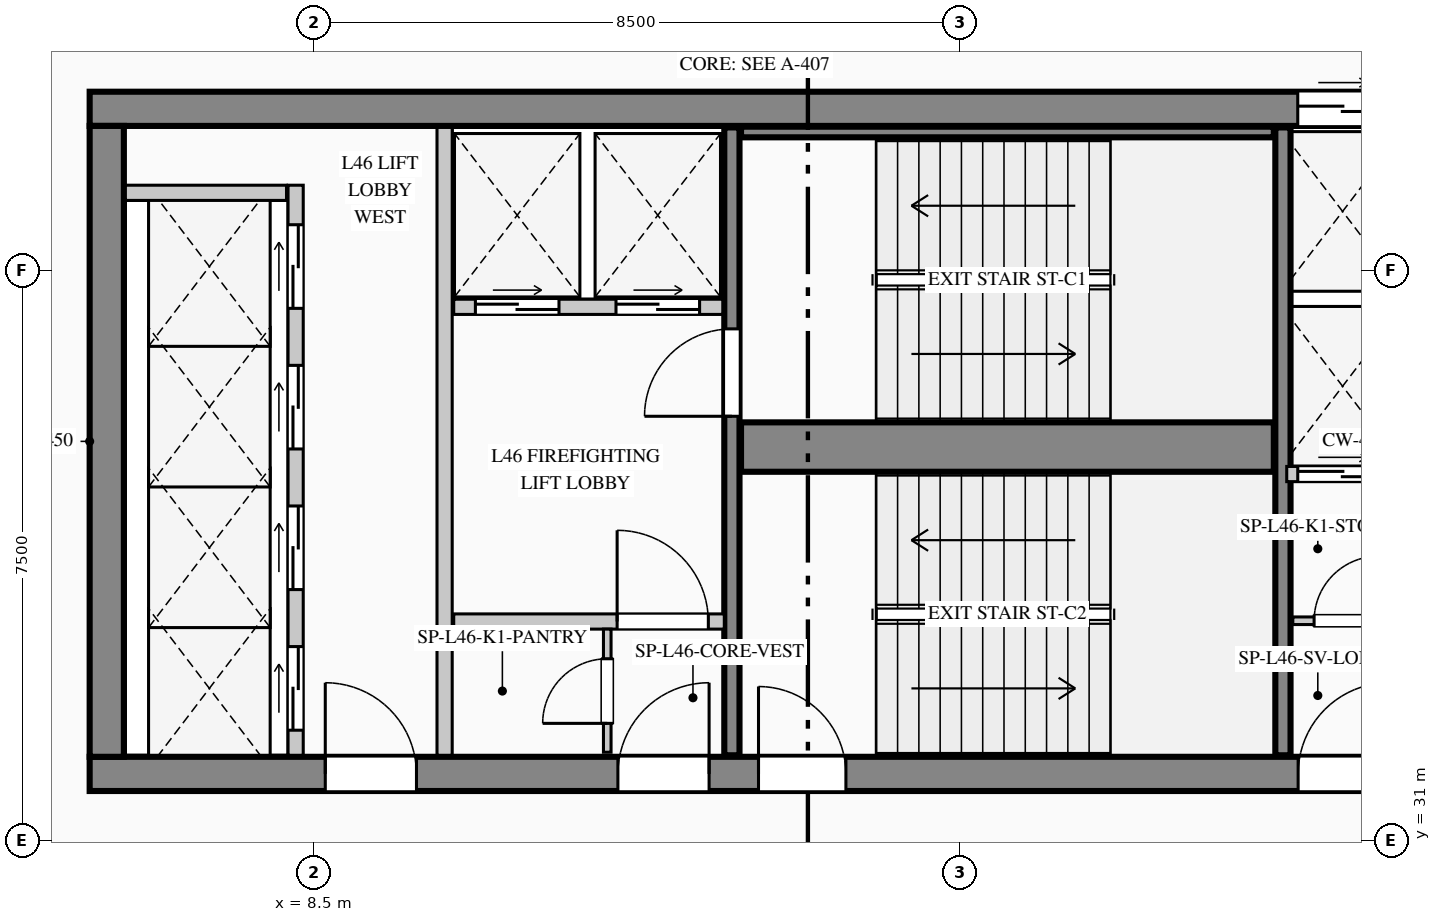
"""IFC4 building model, lengths in metres.
Left out: names, types, materials, properties, quantities, classifications, styles, units other than length and angle.
Written with IfcOpenShell. Run it as: python <this file> out.ifc"""

import sys

from ifc_helpers import new_model, si_unit, direction, frame, frame_2d, origin, place, context, subcontext, project, spatial, rectangle, extrude, element, fill, save


model = new_model("IFC4")
c1 = context("Model", 3, precision=1e-05, world=origin(), true_north=direction((0.0, 1.0)))
c2 = subcontext(c1, "Body", "Model", "MODEL_VIEW")
j1 = project(units=[si_unit("LENGTHUNIT", "METRE"), si_unit("PLANEANGLEUNIT", "RADIAN")], contexts=[c1])
p1 = place(None, origin())
s1 = spatial("IfcSite", under=j1, at=p1, CompositionType="ELEMENT")
p2 = place(p1, origin())
s2 = spatial("IfcBuilding", under=s1, at=p2, CompositionType="ELEMENT")
p3 = place(p2, frame((0.0, 0.0, 195.6)))
s3 = spatial("IfcBuildingStorey", under=s2, at=p3, CompositionType="ELEMENT", Elevation=195.6)
p4 = place(p3, frame((5.55, 40.625, 0.0), z_axis=(0.0, 0.0, 1.0), x_axis=(1.0, 0.0, 0.0)))
e1 = element("IfcWall", 1, at=p4, inside=s3, PredefinedType="SHEAR", context=c2, shape_type="SweptSolid", body=[
    extrude(rectangle(XDim=17.75, YDim=0.45, at=frame_2d((8.875, 0.0))), origin(), (0.0, 0.0, 1.0), 3.95),
])
p5 = place(p4, frame((15.895, 0.0, 0.0)))
e2 = element("IfcOpeningElement", 2, at=p5, cuts=e1, PredefinedType="OPENING", context=c2, shape_type="SweptSolid", body=[
    extrude(rectangle(XDim=1.18, YDim=2.25, at=frame_2d((0.59, 1.125))), frame((0.0, 0.235, 0.0), z_axis=(0.0, -1.0, 0.0), x_axis=(1.0, 0.0, 0.0)), (0.0, 0.0, 1.0), 0.47),
])
p6 = place(p3, frame((5.55, 31.875, 0.0), z_axis=(0.0, 0.0, 1.0), x_axis=(1.0, 0.0, 0.0)))
e3 = element("IfcWall", 3, at=p6, inside=s3, PredefinedType="SHEAR", context=c2, shape_type="SweptSolid", body=[
    extrude(rectangle(XDim=17.75, YDim=0.45, at=frame_2d((8.875, 0.0))), origin(), (0.0, 0.0, 1.0), 3.95),
])
p7 = place(p6, frame((3.1, 0.0, 0.0)))
e4 = element("IfcOpeningElement", 4, at=p7, cuts=e3, PredefinedType="OPENING", context=c2, shape_type="SweptSolid", body=[
    extrude(rectangle(XDim=1.2, YDim=2.2, at=frame_2d((0.6, 1.1))), frame((0.0, 0.235, 0.0), z_axis=(0.0, -1.0, 0.0), x_axis=(1.0, 0.0, 0.0)), (0.0, 0.0, 1.0), 0.47),
])
p8 = place(p6, frame((6.95, 0.0, 0.0)))
e5 = element("IfcOpeningElement", 5, at=p8, cuts=e3, PredefinedType="OPENING", context=c2, shape_type="SweptSolid", body=[
    extrude(rectangle(XDim=1.2, YDim=2.2, at=frame_2d((0.6, 1.1))), frame((0.0, 0.235, 0.0), z_axis=(0.0, -1.0, 0.0), x_axis=(1.0, 0.0, 0.0)), (0.0, 0.0, 1.0), 0.47),
])
p9 = place(p6, frame((8.8, 0.0, 0.0)))
e6 = element("IfcOpeningElement", 6, at=p9, cuts=e3, PredefinedType="OPENING", context=c2, shape_type="SweptSolid", body=[
    extrude(rectangle(XDim=1.15, YDim=2.2, at=frame_2d((0.575, 1.1))), frame((0.0, 0.235, 0.0), z_axis=(0.0, -1.0, 0.0), x_axis=(1.0, 0.0, 0.0)), (0.0, 0.0, 1.0), 0.47),
])
p10 = place(p6, frame((15.9, 0.0, 0.0)))
e7 = element("IfcOpeningElement", 7, at=p10, cuts=e3, PredefinedType="OPENING", context=c2, shape_type="SweptSolid", body=[
    extrude(rectangle(XDim=1.2, YDim=2.2, at=frame_2d((0.6, 1.1))), frame((0.0, 0.235, 0.0), z_axis=(0.0, -1.0, 0.0), x_axis=(1.0, 0.0, 0.0)), (0.0, 0.0, 1.0), 0.47),
])
p11 = place(p3, frame((5.775, 32.1, 0.0), z_axis=(0.0, 0.0, 1.0), x_axis=(0.0, 1.0, 0.0)))
e8 = element("IfcWall", 8, at=p11, inside=s3, PredefinedType="SHEAR", context=c2, shape_type="SweptSolid", body=[
    extrude(rectangle(XDim=8.3, YDim=0.45, at=frame_2d((4.15, 0.0))), origin(), (0.0, 0.0, 1.0), 3.95),
])
p12 = place(p3, frame((14.0, 32.12, 0.0), z_axis=(0.0, 0.0, 1.0), x_axis=(0.0, 1.0, 0.0)))
e9 = element("IfcWall", 9, at=p12, inside=s3, PredefinedType="SHEAR", context=c2, shape_type="SweptSolid", body=[
    extrude(rectangle(XDim=8.26, YDim=0.2, at=frame_2d((4.13, 0.0))), origin(), (0.0, 0.0, 1.0), 3.95),
])
p13 = place(p12, frame((4.46, 0.0, 0.0)))
e10 = element("IfcOpeningElement", 10, at=p13, cuts=e9, PredefinedType="OPENING", context=c2, shape_type="SweptSolid", body=[
    extrude(rectangle(XDim=1.15, YDim=2.2, at=frame_2d((0.575, 1.1))), frame((0.0, 0.11, 0.0), z_axis=(0.0, -1.0, 0.0), x_axis=(1.0, 0.0, 0.0)), (0.0, 0.0, 1.0), 0.22),
])
p14 = place(p3, frame((14.12, 36.175, 0.0), z_axis=(0.0, 0.0, 1.0), x_axis=(1.0, 0.0, 0.0)))
e11 = element("IfcWall", 11, at=p14, inside=s3, PredefinedType="SHEAR", context=c2, shape_type="SweptSolid", body=[
    extrude(rectangle(XDim=7.01, YDim=0.65, at=frame_2d((3.505, 0.0))), origin(), (0.0, 0.0, 1.0), 3.95),
])
p15 = place(p3, frame((21.25, 32.12, 0.0), z_axis=(0.0, 0.0, 1.0), x_axis=(0.0, 1.0, 0.0)))
e12 = element("IfcWall", 12, at=p15, inside=s3, PredefinedType="SHEAR", context=c2, shape_type="SweptSolid", body=[
    extrude(rectangle(XDim=8.26, YDim=0.2, at=frame_2d((4.13, 0.0))), origin(), (0.0, 0.0, 1.0), 3.95),
])
p16 = place(p3, frame((14.12, 40.32, 0.0), z_axis=(0.0, 0.0, 1.0), x_axis=(1.0, 0.0, 0.0)))
e13 = element("IfcWall", 13, at=p16, inside=s3, PredefinedType="SHEAR", context=c2, shape_type="SweptSolid", body=[
    extrude(rectangle(XDim=7.01, YDim=0.14, at=frame_2d((3.505, 0.0))), origin(), (0.0, 0.0, 1.0), 3.95),
])
p17 = place(p3, frame((7.469, 4.63, 0.0), z_axis=(0.0, 0.0, 1.0), x_axis=(-0.123515300309, 0.992342667928, 0.0)))
e14 = element("IfcWall", 14, at=p17, inside=s3, PredefinedType="STANDARD", context=c2, shape_type="SweptSolid", body=[
    extrude(rectangle(XDim=37.024, YDim=0.26, at=frame_2d((18.512, 0.0))), origin(), (0.0, 0.0, 1.0), 3.7),
])
p18 = place(p17, frame((11.978, 0.0, 0.9)))
e15 = element("IfcOpeningElement", 15, at=p18, cuts=e14, PredefinedType="OPENING", context=c2, shape_type="SweptSolid", body=[
    extrude(rectangle(XDim=2.7, YDim=2.1, at=frame_2d((1.35, 1.05))), frame((0.0, 0.14, 0.0), z_axis=(0.0, -1.0, 0.0), x_axis=(1.0, 0.0, 0.0)), (0.0, 0.0, 1.0), 0.28),
])
p19 = place(p3, frame((8.26, 32.12, 0.0), z_axis=(0.0, 0.0, 1.0), x_axis=(0.0, 1.0, 0.0)))
e16 = element("IfcWall", 16, at=p19, inside=s3, PredefinedType="PARTITIONING", context=c2, shape_type="SweptSolid", body=[
    extrude(rectangle(XDim=7.5, YDim=0.2, at=frame_2d((3.75, 0.0))), origin(), (0.0, 0.0, 1.0), 3.7),
])
p20 = place(p19, frame((0.33, 0.0, 0.0)))
e17 = element("IfcOpeningElement", 17, at=p20, cuts=e16, PredefinedType="OPENING", context=c2, shape_type="SweptSolid", body=[
    extrude(rectangle(XDim=1.1, YDim=2.2, at=frame_2d((0.55, 1.1))), frame((0.0, 0.11, 0.0), z_axis=(0.0, -1.0, 0.0), x_axis=(1.0, 0.0, 0.0)), (0.0, 0.0, 1.0), 0.22),
])
p21 = place(p19, frame((2.18, 0.0, 0.0)))
e18 = element("IfcOpeningElement", 18, at=p21, cuts=e16, PredefinedType="OPENING", context=c2, shape_type="SweptSolid", body=[
    extrude(rectangle(XDim=1.1, YDim=2.2, at=frame_2d((0.55, 1.1))), frame((0.0, 0.11, 0.0), z_axis=(0.0, -1.0, 0.0), x_axis=(1.0, 0.0, 0.0)), (0.0, 0.0, 1.0), 0.22),
])
p22 = place(p19, frame((4.03, 0.0, 0.0)))
e19 = element("IfcOpeningElement", 19, at=p22, cuts=e16, PredefinedType="OPENING", context=c2, shape_type="SweptSolid", body=[
    extrude(rectangle(XDim=1.1, YDim=2.2, at=frame_2d((0.55, 1.1))), frame((0.0, 0.11, 0.0), z_axis=(0.0, -1.0, 0.0), x_axis=(1.0, 0.0, 0.0)), (0.0, 0.0, 1.0), 0.22),
])
p23 = place(p19, frame((5.88, 0.0, 0.0)))
e20 = element("IfcOpeningElement", 20, at=p23, cuts=e16, PredefinedType="OPENING", context=c2, shape_type="SweptSolid", body=[
    extrude(rectangle(XDim=1.1, YDim=2.2, at=frame_2d((0.55, 1.1))), frame((0.0, 0.11, 0.0), z_axis=(0.0, -1.0, 0.0), x_axis=(1.0, 0.0, 0.0)), (0.0, 0.0, 1.0), 0.22),
])
p24 = place(p3, frame((6.02, 39.52, 0.0), z_axis=(0.0, 0.0, 1.0), x_axis=(1.0, 0.0, 0.0)))
e21 = element("IfcWall", 21, at=p24, inside=s3, PredefinedType="PARTITIONING", context=c2, shape_type="SweptSolid", body=[
    extrude(rectangle(XDim=2.12, YDim=0.2, at=frame_2d((1.06, 0.0))), origin(), (0.0, 0.0, 1.0), 3.7),
])
p25 = place(p3, frame((10.22, 32.12, 0.0), z_axis=(0.0, 0.0, 1.0), x_axis=(0.0, 1.0, 0.0)))
e22 = element("IfcWall", 22, at=p25, inside=s3, PredefinedType="PARTITIONING", context=c2, shape_type="SweptSolid", body=[
    extrude(rectangle(XDim=8.26, YDim=0.2, at=frame_2d((4.13, 0.0))), origin(), (0.0, 0.0, 1.0), 3.7),
])
p26 = place(p3, frame((10.34, 38.02, 0.0), z_axis=(0.0, 0.0, 1.0), x_axis=(1.0, 0.0, 0.0)))
e23 = element("IfcWall", 23, at=p26, inside=s3, PredefinedType="PARTITIONING", context=c2, shape_type="SweptSolid", body=[
    extrude(rectangle(XDim=3.54, YDim=0.2, at=frame_2d((1.77, 0.0))), origin(), (0.0, 0.0, 1.0), 3.7),
])
p27 = place(p26, frame((0.285, 0.0, 0.0)))
e24 = element("IfcOpeningElement", 24, at=p27, cuts=e23, PredefinedType="OPENING", context=c2, shape_type="SweptSolid", body=[
    extrude(rectangle(XDim=1.1, YDim=2.2, at=frame_2d((0.55, 1.1))), frame((0.0, 0.11, 0.0), z_axis=(0.0, -1.0, 0.0), x_axis=(1.0, 0.0, 0.0)), (0.0, 0.0, 1.0), 0.22),
])
p28 = place(p26, frame((2.135, 0.0, 0.0)))
e25 = element("IfcOpeningElement", 25, at=p28, cuts=e23, PredefinedType="OPENING", context=c2, shape_type="SweptSolid", body=[
    extrude(rectangle(XDim=1.1, YDim=2.2, at=frame_2d((0.55, 1.1))), frame((0.0, 0.11, 0.0), z_axis=(0.0, -1.0, 0.0), x_axis=(1.0, 0.0, 0.0)), (0.0, 0.0, 1.0), 0.22),
])
p29 = place(p3, frame((10.34, 33.88, 0.0), z_axis=(0.0, 0.0, 1.0), x_axis=(1.0, 0.0, 0.0)))
e26 = element("IfcWall", 26, at=p29, inside=s3, PredefinedType="PARTITIONING", context=c2, shape_type="SweptSolid", body=[
    extrude(rectangle(XDim=3.56, YDim=0.2, at=frame_2d((1.78, 0.0))), origin(), (0.0, 0.0, 1.0), 3.7),
])
p30 = place(p29, frame((2.15, 0.0, 0.0)))
e27 = element("IfcOpeningElement", 27, at=p30, cuts=e26, PredefinedType="OPENING", context=c2, shape_type="SweptSolid", body=[
    extrude(rectangle(XDim=1.2, YDim=2.2, at=frame_2d((0.6, 1.1))), frame((0.0, 0.11, 0.0), z_axis=(0.0, -1.0, 0.0), x_axis=(1.0, 0.0, 0.0)), (0.0, 0.0, 1.0), 0.22),
])
p31 = place(p3, frame((12.36, 32.16, 0.0), z_axis=(0.0, 0.0, 1.0), x_axis=(0.0, 1.0, 0.0)))
e28 = element("IfcWall", 28, at=p31, inside=s3, PredefinedType="PARTITIONING", context=c2, shape_type="SweptSolid", body=[
    extrude(rectangle(XDim=1.62, YDim=0.1, at=frame_2d((0.81, 0.0))), origin(), (0.0, 0.0, 1.0), 3.7),
])
p32 = place(p31, frame((0.38, 0.0, 0.0)))
e29 = element("IfcOpeningElement", 29, at=p32, cuts=e28, PredefinedType="OPENING", context=c2, shape_type="SweptSolid", body=[
    extrude(rectangle(XDim=0.85, YDim=2.1, at=frame_2d((0.425, 1.05))), frame((0.0, 0.06, 0.0), z_axis=(0.0, -1.0, 0.0), x_axis=(1.0, 0.0, 0.0)), (0.0, 0.0, 1.0), 0.12),
])
p33 = place(p3, frame((21.38, 33.89, 0.0), z_axis=(0.0, 0.0, 1.0), x_axis=(1.0, 0.0, 0.0)))
e30 = element("IfcWall", 30, at=p33, inside=s3, PredefinedType="PARTITIONING", context=c2, shape_type="SweptSolid", body=[
    extrude(rectangle(XDim=1.42, YDim=0.1, at=frame_2d((0.71, 0.0))), origin(), (0.0, 0.0, 1.0), 3.7),
])
p34 = place(p33, frame((0.28, 0.0, 0.0)))
e31 = element("IfcOpeningElement", 31, at=p34, cuts=e30, PredefinedType="OPENING", context=c2, shape_type="SweptSolid", body=[
    extrude(rectangle(XDim=0.85, YDim=2.1, at=frame_2d((0.425, 1.05))), frame((0.0, 0.06, 0.0), z_axis=(0.0, -1.0, 0.0), x_axis=(1.0, 0.0, 0.0)), (0.0, 0.0, 1.0), 0.12),
])
p35 = place(p3, frame((21.3, 35.82, 0.0), z_axis=(0.0, 0.0, 1.0), x_axis=(1.0, 0.0, 0.0)))
e32 = element("IfcWall", 32, at=p35, inside=s3, PredefinedType="PARTITIONING", context=c2, shape_type="SweptSolid", body=[
    extrude(rectangle(XDim=1.5, YDim=0.2, at=frame_2d((0.75, 0.0))), origin(), (0.0, 0.0, 1.0), 3.7),
])
p36 = place(p35, frame((0.145, 0.0, 0.0)))
e33 = element("IfcOpeningElement", 33, at=p36, cuts=e32, PredefinedType="OPENING", context=c2, shape_type="SweptSolid", body=[
    extrude(rectangle(XDim=1.18, YDim=2.25, at=frame_2d((0.59, 1.125))), frame((0.0, 0.11, 0.0), z_axis=(0.0, -1.0, 0.0), x_axis=(1.0, 0.0, 0.0)), (0.0, 0.0, 1.0), 0.22),
])
p37 = place(p7, origin())
e34 = element("IfcDoor", 34, at=p37, inside=s3, OperationType="SINGLE_SWING_LEFT", PredefinedType="DOOR", context=c2, shape_type="SweptSolid", body=[
    extrude(rectangle(XDim=1.2, YDim=2.2, at=frame_2d((0.6, 1.1))), frame((0.0, 0.025, 0.0), z_axis=(0.0, -1.0, 0.0), x_axis=(1.0, 0.0, 0.0)), (0.0, 0.0, 1.0), 0.05),
])
fill(e4, e34)
p38 = place(p8, origin())
e35 = element("IfcDoor", 35, at=p38, inside=s3, OperationType="SINGLE_SWING_RIGHT", PredefinedType="DOOR", context=c2, shape_type="SweptSolid", body=[
    extrude(rectangle(XDim=1.2, YDim=2.2, at=frame_2d((0.6, 1.1))), frame((0.0, 0.025, 0.0), z_axis=(0.0, -1.0, 0.0), x_axis=(1.0, 0.0, 0.0)), (0.0, 0.0, 1.0), 0.05),
])
fill(e5, e35)
p39 = place(p9, origin())
e36 = element("IfcDoor", 36, at=p39, inside=s3, OperationType="SINGLE_SWING_LEFT", PredefinedType="DOOR", context=c2, shape_type="SweptSolid", body=[
    extrude(rectangle(XDim=1.15, YDim=2.2, at=frame_2d((0.575, 1.1))), frame((0.0, 0.025, 0.0), z_axis=(0.0, -1.0, 0.0), x_axis=(1.0, 0.0, 0.0)), (0.0, 0.0, 1.0), 0.05),
])
fill(e6, e36)
p40 = place(p10, origin())
e37 = element("IfcDoor", 37, at=p40, inside=s3, OperationType="SINGLE_SWING_RIGHT", PredefinedType="DOOR", context=c2, shape_type="SweptSolid", body=[
    extrude(rectangle(XDim=1.2, YDim=2.2, at=frame_2d((0.6, 1.1))), frame((0.0, 0.025, 0.0), z_axis=(0.0, -1.0, 0.0), x_axis=(1.0, 0.0, 0.0)), (0.0, 0.0, 1.0), 0.05),
])
fill(e7, e37)
p41 = place(p30, origin())
e38 = element("IfcDoor", 38, at=p41, inside=s3, OperationType="SINGLE_SWING_LEFT", PredefinedType="DOOR", context=c2, shape_type="SweptSolid", body=[
    extrude(rectangle(XDim=1.2, YDim=2.2, at=frame_2d((0.6, 1.1))), frame((0.0, 0.025, 0.0), z_axis=(0.0, -1.0, 0.0), x_axis=(1.0, 0.0, 0.0)), (0.0, 0.0, 1.0), 0.05),
])
fill(e27, e38)
p42 = place(p32, origin())
e39 = element("IfcDoor", 39, at=p42, inside=s3, OperationType="SINGLE_SWING_LEFT", PredefinedType="DOOR", context=c2, shape_type="SweptSolid", body=[
    extrude(rectangle(XDim=0.85, YDim=2.1, at=frame_2d((0.425, 1.05))), frame((0.0, 0.025, 0.0), z_axis=(0.0, -1.0, 0.0), x_axis=(1.0, 0.0, 0.0)), (0.0, 0.0, 1.0), 0.05),
])
fill(e29, e39)
p43 = place(p34, origin())
e40 = element("IfcDoor", 40, at=p43, inside=s3, OperationType="SINGLE_SWING_RIGHT", PredefinedType="DOOR", context=c2, shape_type="SweptSolid", body=[
    extrude(rectangle(XDim=0.85, YDim=2.1, at=frame_2d((0.425, 1.05))), frame((0.0, 0.025, 0.0), z_axis=(0.0, -1.0, 0.0), x_axis=(1.0, 0.0, 0.0)), (0.0, 0.0, 1.0), 0.05),
])
fill(e31, e40)
p44 = place(p13, origin())
e41 = element("IfcDoor", 41, at=p44, inside=s3, OperationType="SINGLE_SWING_LEFT", PredefinedType="DOOR", context=c2, shape_type="SweptSolid", body=[
    extrude(rectangle(XDim=1.15, YDim=2.2, at=frame_2d((0.575, 1.1))), frame((0.0, 0.025, 0.0), z_axis=(0.0, -1.0, 0.0), x_axis=(1.0, 0.0, 0.0)), (0.0, 0.0, 1.0), 0.05),
])
fill(e10, e41)
p45 = place(p20, origin())
e42 = element("IfcDoor", 42, at=p45, inside=s3, OperationType="DOUBLE_DOOR_SLIDING", PredefinedType="DOOR", context=c2, shape_type="SweptSolid", body=[
    extrude(rectangle(XDim=1.1, YDim=2.2, at=frame_2d((0.55, 1.1))), frame((0.0, 0.025, 0.0), z_axis=(0.0, -1.0, 0.0), x_axis=(1.0, 0.0, 0.0)), (0.0, 0.0, 1.0), 0.05),
])
fill(e17, e42)
p46 = place(p21, origin())
e43 = element("IfcDoor", 43, at=p46, inside=s3, OperationType="DOUBLE_DOOR_SLIDING", PredefinedType="DOOR", context=c2, shape_type="SweptSolid", body=[
    extrude(rectangle(XDim=1.1, YDim=2.2, at=frame_2d((0.55, 1.1))), frame((0.0, 0.025, 0.0), z_axis=(0.0, -1.0, 0.0), x_axis=(1.0, 0.0, 0.0)), (0.0, 0.0, 1.0), 0.05),
])
fill(e18, e43)
p47 = place(p22, origin())
e44 = element("IfcDoor", 44, at=p47, inside=s3, OperationType="DOUBLE_DOOR_SLIDING", PredefinedType="DOOR", context=c2, shape_type="SweptSolid", body=[
    extrude(rectangle(XDim=1.1, YDim=2.2, at=frame_2d((0.55, 1.1))), frame((0.0, 0.025, 0.0), z_axis=(0.0, -1.0, 0.0), x_axis=(1.0, 0.0, 0.0)), (0.0, 0.0, 1.0), 0.05),
])
fill(e19, e44)
p48 = place(p23, origin())
e45 = element("IfcDoor", 45, at=p48, inside=s3, OperationType="DOUBLE_DOOR_SLIDING", PredefinedType="DOOR", context=c2, shape_type="SweptSolid", body=[
    extrude(rectangle(XDim=1.1, YDim=2.2, at=frame_2d((0.55, 1.1))), frame((0.0, 0.025, 0.0), z_axis=(0.0, -1.0, 0.0), x_axis=(1.0, 0.0, 0.0)), (0.0, 0.0, 1.0), 0.05),
])
fill(e20, e45)
p49 = place(p27, origin())
e46 = element("IfcDoor", 46, at=p49, inside=s3, OperationType="DOUBLE_DOOR_SLIDING", PredefinedType="DOOR", context=c2, shape_type="SweptSolid", body=[
    extrude(rectangle(XDim=1.1, YDim=2.2, at=frame_2d((0.55, 1.1))), frame((0.0, 0.025, 0.0), z_axis=(0.0, -1.0, 0.0), x_axis=(1.0, 0.0, 0.0)), (0.0, 0.0, 1.0), 0.05),
])
fill(e24, e46)
p50 = place(p28, origin())
e47 = element("IfcDoor", 47, at=p50, inside=s3, OperationType="DOUBLE_DOOR_SLIDING", PredefinedType="DOOR", context=c2, shape_type="SweptSolid", body=[
    extrude(rectangle(XDim=1.1, YDim=2.2, at=frame_2d((0.55, 1.1))), frame((0.0, 0.025, 0.0), z_axis=(0.0, -1.0, 0.0), x_axis=(1.0, 0.0, 0.0)), (0.0, 0.0, 1.0), 0.05),
])
fill(e25, e47)
p51 = place(p5, origin())
e48 = element("IfcDoor", 48, at=p51, inside=s3, OperationType="DOUBLE_DOOR_SLIDING", PredefinedType="DOOR", context=c2, shape_type="SweptSolid", body=[
    extrude(rectangle(XDim=1.18, YDim=2.25, at=frame_2d((0.59, 1.125))), frame((0.0, 0.025, 0.0), z_axis=(0.0, -1.0, 0.0), x_axis=(1.0, 0.0, 0.0)), (0.0, 0.0, 1.0), 0.05),
])
fill(e2, e48)
p52 = place(p36, origin())
e49 = element("IfcDoor", 49, at=p52, inside=s3, OperationType="DOUBLE_DOOR_SLIDING", PredefinedType="DOOR", context=c2, shape_type="SweptSolid", body=[
    extrude(rectangle(XDim=1.18, YDim=2.25, at=frame_2d((0.59, 1.125))), frame((0.0, 0.025, 0.0), z_axis=(0.0, -1.0, 0.0), x_axis=(1.0, 0.0, 0.0)), (0.0, 0.0, 1.0), 0.05),
])
fill(e33, e49)
save(model, sys.argv[1])
